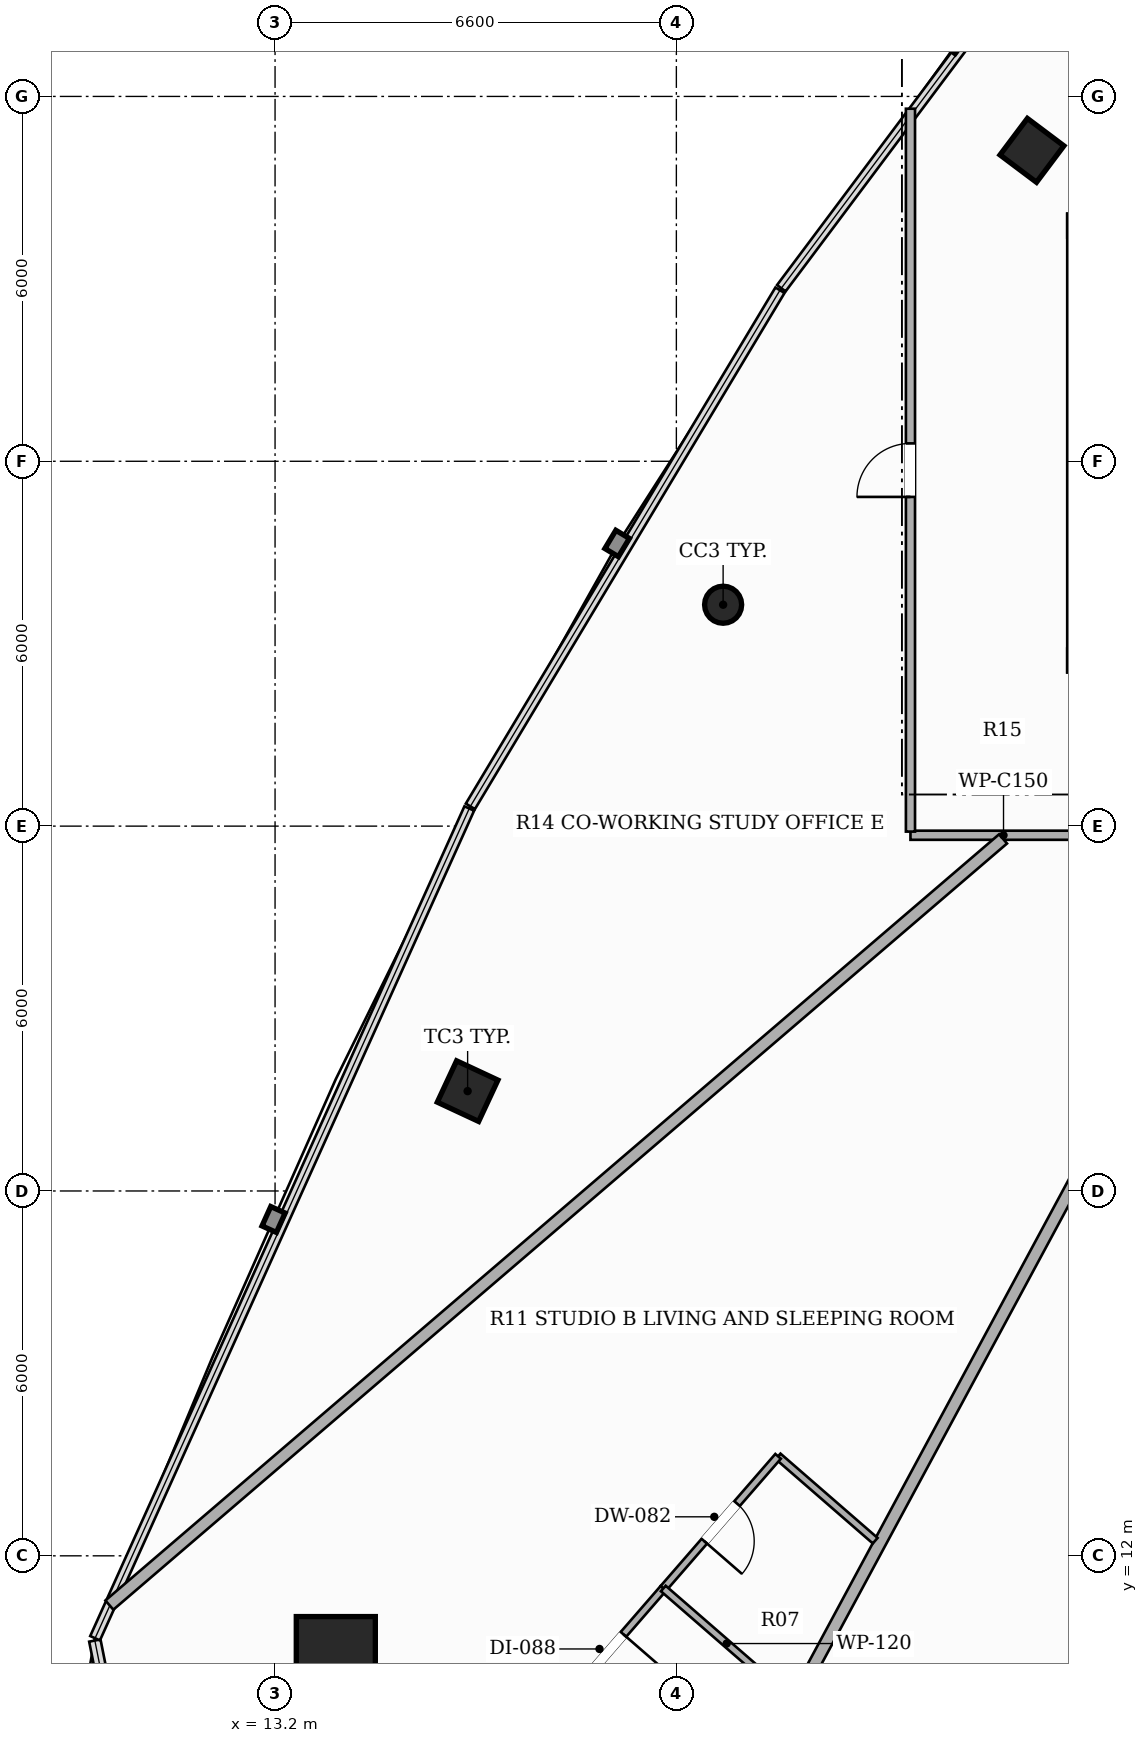
"""IFC4 building model, lengths in metres.
Left out: names, types, materials, properties, quantities, classifications, styles, units other than length and angle.
Written with IfcOpenShell. Run it as: python <this file> out.ifc"""

import sys

from ifc_helpers import new_model, si_unit, direction, frame, frame_2d, origin, origin_2d, place, context, subcontext, project, spatial, rectangle, hollow_rectangle, hollow_circle, extrude, element, fill, save


model = new_model("IFC4")
c1 = context("Model", 3, precision=1e-05, world=origin(), true_north=direction((0.0, 1.0)))
c2 = subcontext(c1, "Body", "Model", "MODEL_VIEW")
j1 = project(units=[si_unit("LENGTHUNIT", "METRE"), si_unit("PLANEANGLEUNIT", "RADIAN")], contexts=[c1])
p1 = place(None, origin())
s1 = spatial("IfcSite", under=j1, at=p1, CompositionType="ELEMENT")
p2 = place(p1, origin())
s2 = spatial("IfcBuilding", under=s1, at=p2, CompositionType="ELEMENT")
p3 = place(p2, frame((0.0, 0.0, 226.1)))
s3 = spatial("IfcBuildingStorey", under=s2, at=p3, CompositionType="ELEMENT", Elevation=226.1)
p4 = place(p3, frame((14.199, 10.351, 0.0), z_axis=(0.0, 0.0, 1.0), x_axis=(1.0, 0.0, 0.0)))
e1 = element("IfcColumn", 1, at=p4, inside=s3, PredefinedType="COLUMN", context=c2, shape_type="SweptSolid", body=[
    extrude(hollow_rectangle(XDim=1.3, YDim=1.3, WallThickness=0.04, at=origin_2d()), origin(), (0.0, 0.0, 1.0), 3.3),
])
p5 = place(p3, frame((25.648, 35.113, 0.0), z_axis=(0.0, 0.0, 1.0), x_axis=(0.600420225326, 0.799684658487, 0.0)))
e2 = element("IfcColumn", 2, at=p5, inside=s3, PredefinedType="COLUMN", context=c2, shape_type="SweptSolid", body=[
    extrude(hollow_rectangle(XDim=0.75, YDim=0.75, WallThickness=0.025, at=origin_2d()), origin(), (0.0, 0.0, 1.0), 3.3),
])
p6 = place(p3, frame((20.569, 27.641, 0.0), z_axis=(0.0, 0.0, 1.0), x_axis=(1.0, 0.0, 0.0)))
e3 = element("IfcColumn", 3, at=p6, inside=s3, PredefinedType="COLUMN", context=c2, shape_type="SweptSolid", body=[
    extrude(hollow_circle(Radius=0.305, WallThickness=0.016, at=origin_2d()), origin(), (0.0, 0.0, 1.0), 3.3),
])
p7 = place(p3, frame((16.367, 19.642, 0.0), z_axis=(0.0, 0.0, 1.0), x_axis=(0.422618261741, 0.906307787037, 0.0)))
e4 = element("IfcColumn", 4, at=p7, inside=s3, PredefinedType="COLUMN", context=c2, shape_type="SweptSolid", body=[
    extrude(hollow_rectangle(XDim=0.75, YDim=0.75, WallThickness=0.025, at=origin_2d()), origin(), (0.0, 0.0, 1.0), 3.3),
])
p8 = place(p3, frame((32.096, 23.85, 0.0), z_axis=(0.0, 0.0, 1.0), x_axis=(-1.0, 0.0, 0.0)))
e5 = element("IfcWall", 5, at=p8, inside=s3, PredefinedType="PARTITIONING", context=c2, shape_type="SweptSolid", body=[
    extrude(rectangle(XDim=8.446, YDim=0.15, at=frame_2d((4.223, 0.0))), origin(), (0.0, 0.0, 1.0), 2.565),
])
p9 = place(p8, frame((4.365, 0.0, 0.0)))
e6 = element("IfcOpeningElement", 6, at=p9, cuts=e5, PredefinedType="OPENING", context=c2, shape_type="SweptSolid", body=[
    extrude(rectangle(XDim=0.92, YDim=2.15, at=frame_2d((0.46, 1.075))), frame((0.0, 0.085, 0.0), z_axis=(0.0, -1.0, 0.0), x_axis=(1.0, 0.0, 0.0)), (0.0, 0.0, 1.0), 0.17),
])
p10 = place(p8, frame((1.045, 0.0, 0.0)))
e7 = element("IfcOpeningElement", 7, at=p10, cuts=e5, PredefinedType="OPENING", context=c2, shape_type="SweptSolid", body=[
    extrude(rectangle(XDim=0.92, YDim=2.15, at=frame_2d((0.46, 1.075))), frame((0.0, 0.085, 0.0), z_axis=(0.0, -1.0, 0.0), x_axis=(1.0, 0.0, 0.0)), (0.0, 0.0, 1.0), 0.17),
])
p11 = place(p3, frame((23.65, 23.91, 0.0), z_axis=(0.0, 0.0, 1.0), x_axis=(0.0, 1.0, 0.0)))
e8 = element("IfcWall", 8, at=p11, inside=s3, PredefinedType="PARTITIONING", context=c2, shape_type="SweptSolid", body=[
    extrude(rectangle(XDim=11.888, YDim=0.15, at=frame_2d((5.944, 0.0))), origin(), (0.0, 0.0, 1.0), 2.492),
])
p12 = place(p11, frame((5.504, 0.0, 0.0)))
e9 = element("IfcOpeningElement", 9, at=p12, cuts=e8, PredefinedType="OPENING", context=c2, shape_type="SweptSolid", body=[
    extrude(rectangle(XDim=0.88, YDim=2.1, at=frame_2d((0.44, 1.05))), frame((0.0, 0.085, 0.0), z_axis=(0.0, -1.0, 0.0), x_axis=(1.0, 0.0, 0.0)), (0.0, 0.0, 1.0), 0.17),
])
p13 = place(p3, frame((29.385, 23.79, 0.0), z_axis=(0.0, 0.0, 1.0), x_axis=(-0.474361203305, -0.880330306646, 0.0)))
e10 = element("IfcWall", 10, at=p13, inside=s3, PredefinedType="PARTITIONING", context=c2, shape_type="SweptSolid", body=[
    extrude(rectangle(XDim=20.44, YDim=0.2, at=frame_2d((10.22, 0.0))), origin(), (0.0, 0.0, 1.0), 2.492),
])
p14 = place(p3, frame((10.475, 11.19, 0.0), z_axis=(0.0, 0.0, 1.0), x_axis=(0.759210311249, 0.650845375871, 0.0)))
e11 = element("IfcWall", 11, at=p14, inside=s3, PredefinedType="PARTITIONING", context=c2, shape_type="SweptSolid", body=[
    extrude(rectangle(XDim=19.36, YDim=0.2, at=frame_2d((9.68, 0.0))), origin(), (0.0, 0.0, 1.0), 2.492),
])
p15 = place(p3, frame((23.07, 12.249, 0.0), z_axis=(0.0, 0.0, 1.0), x_axis=(-0.75504514731, 0.655672803709, 0.0)))
e12 = element("IfcWall", 12, at=p15, inside=s3, PredefinedType="PARTITIONING", context=c2, shape_type="SweptSolid", body=[
    extrude(rectangle(XDim=2.115, YDim=0.12, at=frame_2d((1.058, 0.0))), origin(), (0.0, 0.0, 1.0), 2.773),
])
p16 = place(p3, frame((21.473, 13.636, 0.0), z_axis=(0.0, 0.0, 1.0), x_axis=(-0.655840593364, -0.754899407932, 0.0)))
e13 = element("IfcWall", 13, at=p16, inside=s3, PredefinedType="PARTITIONING", context=c2, shape_type="SweptSolid", body=[
    extrude(rectangle(XDim=2.879, YDim=0.12, at=frame_2d((1.439, 0.0))), origin(), (0.0, 0.0, 1.0), 2.773),
])
p17 = place(p16, frame((1.029, 0.0, 0.0)))
e14 = element("IfcOpeningElement", 14, at=p17, cuts=e13, PredefinedType="OPENING", context=c2, shape_type="SweptSolid", body=[
    extrude(rectangle(XDim=0.82, YDim=2.1, at=frame_2d((0.41, 1.05))), frame((0.0, 0.07, 0.0), z_axis=(0.0, -1.0, 0.0), x_axis=(1.0, 0.0, 0.0)), (0.0, 0.0, 1.0), 0.14),
])
p18 = place(p3, frame((19.585, 11.463, 0.0), z_axis=(0.0, 0.0, 1.0), x_axis=(-0.655689200825, -0.755030907924, 0.0)))
e15 = element("IfcWall", 15, at=p18, inside=s3, PredefinedType="PARTITIONING", context=c2, shape_type="SweptSolid", body=[
    extrude(rectangle(XDim=2.878, YDim=0.12, at=frame_2d((1.439, 0.0))), origin(), (0.0, 0.0, 1.0), 2.492),
])
p19 = place(p18, frame((0.999, 0.0, 0.0)))
e16 = element("IfcOpeningElement", 16, at=p19, cuts=e15, PredefinedType="OPENING", context=c2, shape_type="SweptSolid", body=[
    extrude(rectangle(XDim=0.88, YDim=2.1, at=frame_2d((0.44, 1.05))), frame((0.0, 0.07, 0.0), z_axis=(0.0, -1.0, 0.0), x_axis=(1.0, 0.0, 0.0)), (0.0, 0.0, 1.0), 0.14),
])
p20 = place(p3, frame((21.67, 9.652, 0.0), z_axis=(0.0, 0.0, 1.0), x_axis=(-0.755003171317, 0.655721138367, 0.0)))
e17 = element("IfcWall", 17, at=p20, inside=s3, PredefinedType="PARTITIONING", context=c2, shape_type="SweptSolid", body=[
    extrude(rectangle(XDim=2.761, YDim=0.12, at=frame_2d((1.381, 0.0))), origin(), (0.0, 0.0, 1.0), 2.773),
])
p21 = place(p17, origin())
e18 = element("IfcDoor", 18, at=p21, inside=s3, OperationType="SINGLE_SWING_RIGHT", PredefinedType="DOOR", context=c2, shape_type="SweptSolid", body=[
    extrude(rectangle(XDim=0.82, YDim=2.1, at=frame_2d((0.41, 1.05))), frame((0.0, 0.025, 0.0), z_axis=(0.0, -1.0, 0.0), x_axis=(1.0, 0.0, 0.0)), (0.0, 0.0, 1.0), 0.05),
])
fill(e14, e18)
p22 = place(p19, origin())
e19 = element("IfcDoor", 19, at=p22, inside=s3, OperationType="SINGLE_SWING_LEFT", PredefinedType="DOOR", context=c2, shape_type="SweptSolid", body=[
    extrude(rectangle(XDim=0.88, YDim=2.1, at=frame_2d((0.44, 1.05))), frame((0.0, 0.025, 0.0), z_axis=(0.0, -1.0, 0.0), x_axis=(1.0, 0.0, 0.0)), (0.0, 0.0, 1.0), 0.05),
])
fill(e16, e19)
p23 = place(p12, origin())
e20 = element("IfcDoor", 20, at=p23, inside=s3, OperationType="SINGLE_SWING_LEFT", PredefinedType="DOOR", context=c2, shape_type="SweptSolid", body=[
    extrude(rectangle(XDim=0.88, YDim=2.1, at=frame_2d((0.44, 1.05))), frame((0.0, 0.025, 0.0), z_axis=(0.0, -1.0, 0.0), x_axis=(1.0, 0.0, 0.0)), (0.0, 0.0, 1.0), 0.05),
])
fill(e9, e20)
save(model, sys.argv[1])
